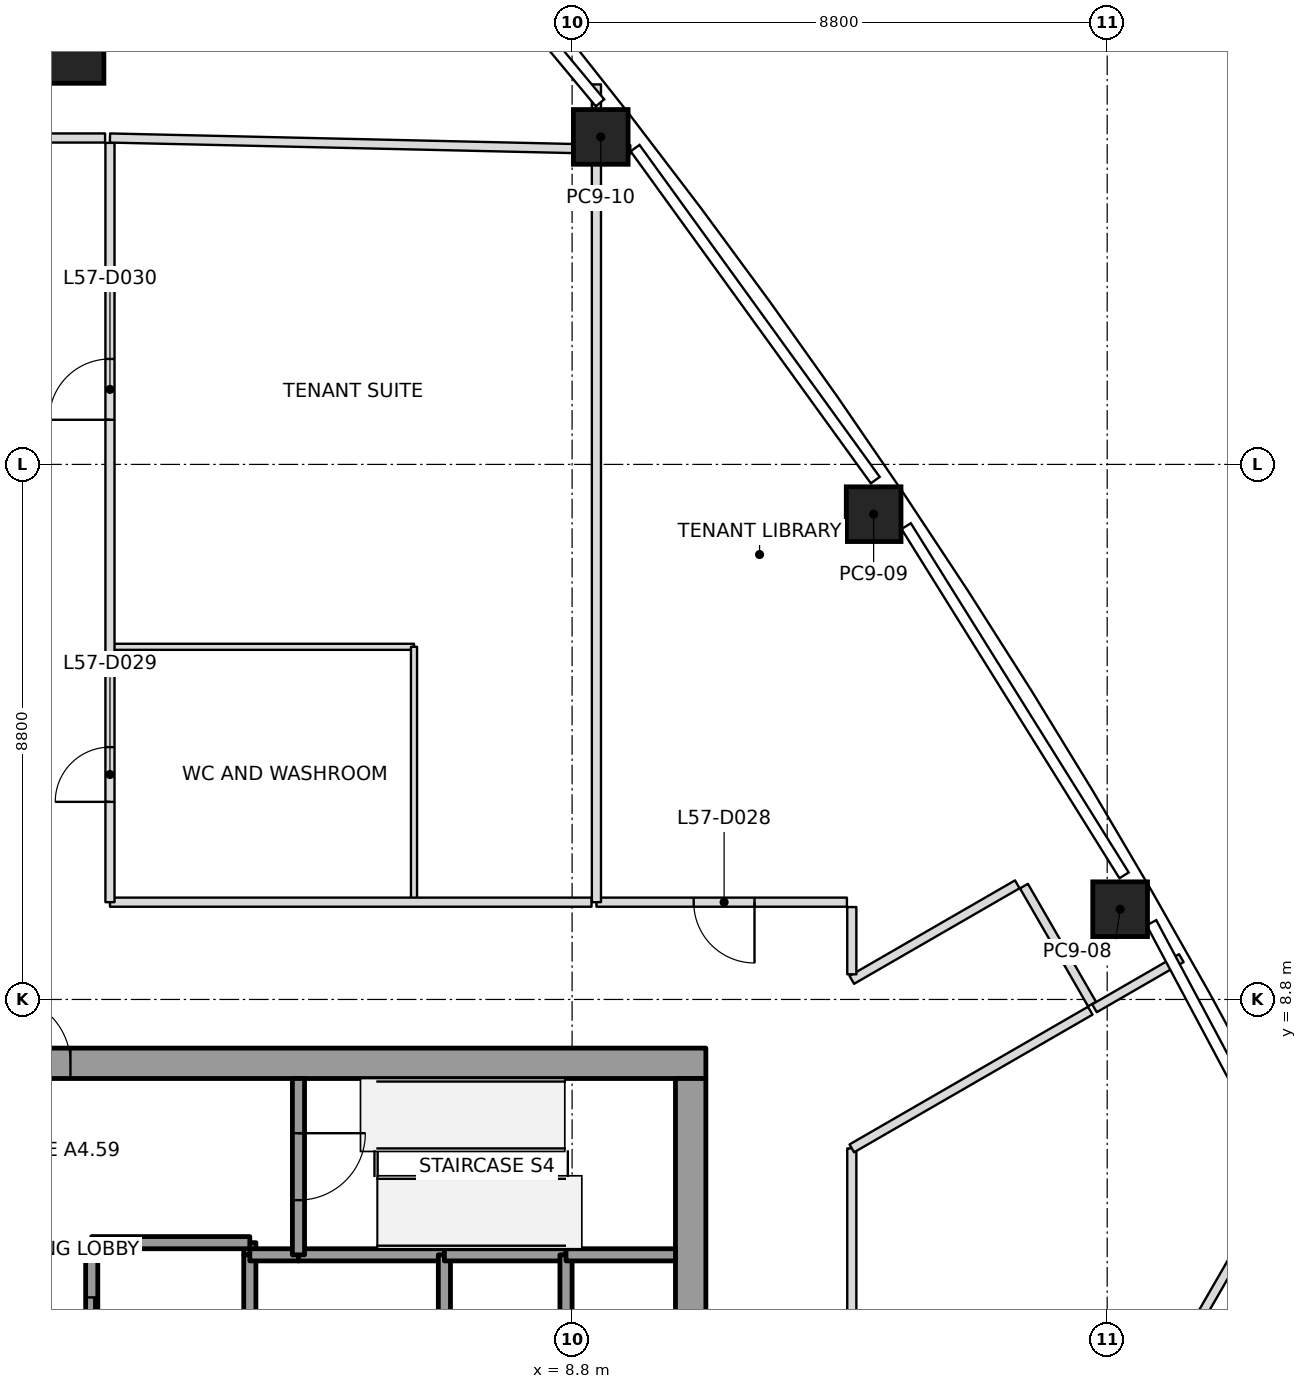
"""IFC4 building model, lengths in metres.
Left out: names, types, materials, properties, quantities, classifications, styles, units other than length and angle.
Written with IfcOpenShell. Run it as: python <this file> out.ifc"""

import sys

from ifc_helpers import new_model, si_unit, direction, frame, frame_2d, origin, origin_2d, place, context, subcontext, project, spatial, rectangle, extrude, element, fill, save


model = new_model("IFC4")
c1 = context("Model", 3, precision=1e-05, world=origin(), true_north=direction((0.0, 1.0)))
c2 = subcontext(c1, "Body", "Model", "MODEL_VIEW")
j1 = project(units=[si_unit("LENGTHUNIT", "METRE"), si_unit("PLANEANGLEUNIT", "RADIAN")], contexts=[c1])
p1 = place(None, origin())
s1 = spatial("IfcSite", under=j1, at=p1, CompositionType="ELEMENT")
p2 = place(p1, origin())
s2 = spatial("IfcBuilding", under=s1, at=p2, CompositionType="ELEMENT")
p3 = place(p2, frame((0.0, 0.0, 255.0)))
s3 = spatial("IfcBuildingStorey", under=s2, at=p3, CompositionType="ELEMENT", Elevation=255.0)
p4 = place(p3, frame((0.0, 24.968, 0.0), z_axis=(0.0, -0.032148900677, 0.999483090495), x_axis=(1.0, 0.0, 0.0)))
e1 = element("IfcColumn", 1, at=p4, inside=s3, PredefinedType="COLUMN", context=c2, shape_type="SweptSolid", body=[
    extrude(rectangle(XDim=2.2, YDim=2.2, at=origin_2d()), origin(), (0.0, 0.0, 1.0), 4.002),
])
p5 = place(p3, frame((17.813, 10.284, 0.0), z_axis=(-0.00994807791, -0.005675897212, 0.999934407817), x_axis=(-0.499975258324, 0.866039685968, -5.8244404e-05)))
e2 = element("IfcColumn", 2, at=p5, inside=s3, PredefinedType="COLUMN", context=c2, shape_type="SweptSolid", body=[
    extrude(rectangle(XDim=0.9, YDim=0.9, at=origin_2d()), origin(), (0.0, 0.0, 1.0), 4.0),
])
p6 = place(p3, frame((13.759, 16.781, 0.0), z_axis=(-0.005248490815, -0.013243284963, 0.999898529226), x_axis=(-0.558035807568, 0.829777716306, 0.008060954894)))
e3 = element("IfcColumn", 3, at=p6, inside=s3, PredefinedType="COLUMN", context=c2, shape_type="SweptSolid", body=[
    extrude(rectangle(XDim=0.9, YDim=0.9, at=origin_2d()), origin(), (0.0, 0.0, 1.0), 4.0),
])
p7 = place(p3, frame((9.271, 22.986, 0.0), z_axis=(-0.000244089904, -0.020381506962, 0.999792245716), x_axis=(-0.613475058101, 0.789553090619, 0.015945851565)))
e4 = element("IfcColumn", 4, at=p7, inside=s3, PredefinedType="COLUMN", context=c2, shape_type="SweptSolid", body=[
    extrude(rectangle(XDim=0.9, YDim=0.9, at=origin_2d()), origin(), (0.0, 0.0, 1.0), 4.001),
])
p8 = place(p3, frame((-11.0, 7.75, 0.0), z_axis=(0.0, 0.0, 1.0), x_axis=(1.0, 0.0, 0.0)))
e5 = element("IfcWall", 5, at=p8, inside=s3, PredefinedType="SHEAR", context=c2, shape_type="SweptSolid", body=[
    extrude(rectangle(XDim=22.0, YDim=0.5, at=frame_2d((11.0, 0.0))), origin(), (0.0, 0.0, 1.0), 4.0),
])
p9 = place(p8, frame((10.45, 0.0, 0.0)))
e6 = element("IfcOpeningElement", 6, at=p9, cuts=e5, PredefinedType="OPENING", context=c2, shape_type="SweptSolid", body=[
    extrude(rectangle(XDim=1.1, YDim=2.1, at=frame_2d((0.55, 1.05))), frame((0.0, 0.25, 0.0), z_axis=(0.0, -1.0, 0.0), x_axis=(1.0, 0.0, 0.0)), (0.0, 0.0, 1.0), 0.5),
])
p10 = place(p3, frame((10.75, -7.5, 0.0), z_axis=(0.0, 0.0, 1.0), x_axis=(0.0, 1.0, 0.0)))
e7 = element("IfcWall", 7, at=p10, inside=s3, PredefinedType="SHEAR", context=c2, shape_type="SweptSolid", body=[
    extrude(rectangle(XDim=15.0, YDim=0.5, at=frame_2d((7.5, 0.0))), origin(), (0.0, 0.0, 1.0), 4.0),
])
p11 = place(p10, frame((6.6, 0.0, 0.0)))
e8 = element("IfcOpeningElement", 8, at=p11, cuts=e7, PredefinedType="OPENING", context=c2, shape_type="SweptSolid", body=[
    extrude(rectangle(XDim=1.8, YDim=2.1, at=frame_2d((0.9, 1.05))), frame((0.0, 0.25, 0.0), z_axis=(0.0, -1.0, 0.0), x_axis=(1.0, 0.0, 0.0)), (0.0, 0.0, 1.0), 0.5),
])
p12 = place(p3, frame((3.5, 4.6, 0.0), z_axis=(0.0, 0.0, 1.0), x_axis=(0.0, 1.0, 0.0)))
e9 = element("IfcWall", 9, at=p12, inside=s3, PredefinedType="SOLIDWALL", context=c2, shape_type="SweptSolid", body=[
    extrude(rectangle(XDim=0.2, YDim=0.2, at=frame_2d((0.1, 0.0))), origin(), (0.0, 0.0, 1.0), 3.85),
])
p13 = place(p3, frame((3.5, 4.8, 0.0), z_axis=(0.0, 0.0, 1.0), x_axis=(-1.0, 0.0, 0.0)))
e10 = element("IfcWall", 10, at=p13, inside=s3, PredefinedType="SOLIDWALL", context=c2, shape_type="SweptSolid", body=[
    extrude(rectangle(XDim=2.6, YDim=0.2, at=frame_2d((1.3, 0.0))), origin(), (0.0, 0.0, 1.0), 3.85),
])
p14 = place(p3, frame((0.9, 4.8, 0.0), z_axis=(0.0, 0.0, 1.0), x_axis=(0.0, -1.0, 0.0)))
e11 = element("IfcWall", 11, at=p14, inside=s3, PredefinedType="SOLIDWALL", context=c2, shape_type="SweptSolid", body=[
    extrude(rectangle(XDim=3.0, YDim=0.2, at=frame_2d((1.5, 0.0))), origin(), (0.0, 0.0, 1.0), 3.85),
])
p15 = place(p14, frame((0.9, 0.0, 0.0)))
e12 = element("IfcOpeningElement", 12, at=p15, cuts=e11, PredefinedType="OPENING", context=c2, shape_type="SweptSolid", body=[
    extrude(rectangle(XDim=1.2, YDim=2.1, at=frame_2d((0.6, 1.05))), frame((0.0, 0.1, 0.0), z_axis=(0.0, -1.0, 0.0), x_axis=(1.0, 0.0, 0.0)), (0.0, 0.0, 1.0), 0.2),
])
p16 = place(p3, frame((3.5, 4.6, 0.0), z_axis=(0.0, 0.0, 1.0), x_axis=(0.0, -1.0, 0.0)))
e13 = element("IfcWall", 13, at=p16, inside=s3, PredefinedType="SOLIDWALL", context=c2, shape_type="SweptSolid", body=[
    extrude(rectangle(XDim=2.8, YDim=0.2, at=frame_2d((1.4, 0.0))), origin(), (0.0, 0.0, 1.0), 3.85),
])
p17 = place(p3, frame((4.3, 4.6, 0.0), z_axis=(0.0, 0.0, 1.0), x_axis=(-1.0, 0.0, 0.0)))
e14 = element("IfcWall", 14, at=p17, inside=s3, PredefinedType="SOLIDWALL", context=c2, shape_type="SweptSolid", body=[
    extrude(rectangle(XDim=0.8, YDim=0.2, at=frame_2d((0.4, 0.0))), origin(), (0.0, 0.0, 1.0), 3.85),
])
p18 = place(p3, frame((6.7, 4.6, 0.0), z_axis=(0.0, 0.0, 1.0), x_axis=(-1.0, 0.0, 0.0)))
e15 = element("IfcWall", 15, at=p18, inside=s3, PredefinedType="SOLIDWALL", context=c2, shape_type="SweptSolid", body=[
    extrude(rectangle(XDim=2.4, YDim=0.2, at=frame_2d((1.2, 0.0))), origin(), (0.0, 0.0, 1.0), 3.85),
])
p19 = place(p3, frame((4.3, 7.5, 0.0), z_axis=(0.0, 0.0, 1.0), x_axis=(0.0, -1.0, 0.0)))
e16 = element("IfcWall", 16, at=p19, inside=s3, PredefinedType="SOLIDWALL", context=c2, shape_type="SweptSolid", body=[
    extrude(rectangle(XDim=2.9, YDim=0.2, at=frame_2d((1.45, 0.0))), origin(), (0.0, 0.0, 1.0), 3.85),
])
p20 = place(p19, frame((0.9, 0.0, 0.0)))
e17 = element("IfcOpeningElement", 17, at=p20, cuts=e16, PredefinedType="OPENING", context=c2, shape_type="SweptSolid", body=[
    extrude(rectangle(XDim=1.1, YDim=2.1, at=frame_2d((0.55, 1.05))), frame((0.0, 0.1, 0.0), z_axis=(0.0, -1.0, 0.0), x_axis=(1.0, 0.0, 0.0)), (0.0, 0.0, 1.0), 0.2),
])
p21 = place(p3, frame((6.7, 1.8, 0.0), z_axis=(0.0, 0.0, 1.0), x_axis=(0.0, 1.0, 0.0)))
e18 = element("IfcWall", 18, at=p21, inside=s3, PredefinedType="SOLIDWALL", context=c2, shape_type="SweptSolid", body=[
    extrude(rectangle(XDim=2.8, YDim=0.2, at=frame_2d((1.4, 0.0))), origin(), (0.0, 0.0, 1.0), 3.85),
])
p22 = place(p3, frame((8.7, 4.6, 0.0), z_axis=(0.0, 0.0, 1.0), x_axis=(-1.0, 0.0, 0.0)))
e19 = element("IfcWall", 19, at=p22, inside=s3, PredefinedType="SOLIDWALL", context=c2, shape_type="SweptSolid", body=[
    extrude(rectangle(XDim=2.0, YDim=0.2, at=frame_2d((1.0, 0.0))), origin(), (0.0, 0.0, 1.0), 3.85),
])
p23 = place(p3, frame((8.7, 1.8, 0.0), z_axis=(0.0, 0.0, 1.0), x_axis=(0.0, 1.0, 0.0)))
e20 = element("IfcWall", 20, at=p23, inside=s3, PredefinedType="SOLIDWALL", context=c2, shape_type="SweptSolid", body=[
    extrude(rectangle(XDim=2.8, YDim=0.2, at=frame_2d((1.4, 0.0))), origin(), (0.0, 0.0, 1.0), 3.85),
])
p24 = place(p3, frame((10.5, 4.6, 0.0), z_axis=(0.0, 0.0, 1.0), x_axis=(-1.0, 0.0, 0.0)))
e21 = element("IfcWall", 21, at=p24, inside=s3, PredefinedType="SOLIDWALL", context=c2, shape_type="SweptSolid", body=[
    extrude(rectangle(XDim=1.8, YDim=0.2, at=frame_2d((0.9, 0.0))), origin(), (0.0, 0.0, 1.0), 3.85),
])
p25 = place(p3, frame((1.2, 22.968, 0.0), z_axis=(0.0, 0.0, 1.0), x_axis=(0.99974152619, -0.022735012879, 0.0)))
e22 = element("IfcWall", 22, at=p25, inside=s3, PredefinedType="PARTITIONING", context=c2, shape_type="SweptSolid", body=[
    extrude(rectangle(XDim=8.559, YDim=0.15, at=frame_2d((4.279, 0.0))), origin(), (0.0, 0.0, 1.0), 3.3),
])
p26 = place(p3, frame((9.2, 10.4, 0.0), z_axis=(0.0, 0.0, 1.0), x_axis=(0.0, 1.0, 0.0)))
e23 = element("IfcWall", 23, at=p26, inside=s3, PredefinedType="PARTITIONING", context=c2, shape_type="SweptSolid", body=[
    extrude(rectangle(XDim=13.45, YDim=0.15, at=frame_2d((6.725, 0.0))), origin(), (0.0, 0.0, 1.0), 3.3),
])
p27 = place(p3, frame((20.62, 6.154, 0.0), z_axis=(0.0, 0.0, 1.0), x_axis=(-0.500001511722, -0.866024530989, 0.0)))
e24 = element("IfcWall", 24, at=p27, inside=s3, PredefinedType="PARTITIONING", context=c2, shape_type="SweptSolid", body=[
    extrude(rectangle(XDim=14.439, YDim=0.15, at=frame_2d((7.22, 0.0))), origin(), (0.0, 0.0, 1.0), 3.084),
])
p28 = place(p3, frame((17.391, 8.655, 0.0), z_axis=(0.0, 0.0, 1.0), x_axis=(0.865966208357, 0.500102515474, 0.0)))
e25 = element("IfcWall", 25, at=p28, inside=s3, PredefinedType="PARTITIONING", context=c2, shape_type="SweptSolid", body=[
    extrude(rectangle(XDim=1.65, YDim=0.15, at=frame_2d((0.825, 0.0))), origin(), (0.0, 0.0, 1.0), 3.084),
])
p29 = place(p3, frame((1.12, 22.968, 0.0), z_axis=(0.0, 0.0, 1.0), x_axis=(-1.0, 0.0, 0.0)))
e26 = element("IfcWall", 26, at=p29, inside=s3, PredefinedType="PARTITIONING", context=c2, shape_type="SweptSolid", body=[
    extrude(rectangle(XDim=2.24, YDim=0.15, at=frame_2d((1.12, 0.0))), origin(), (0.0, 0.0, 1.0), 3.233),
])
p30 = place(p3, frame((9.12, 10.4, 0.0), z_axis=(0.0, 0.0, 1.0), x_axis=(-1.0, 0.0, 0.0)))
e27 = element("IfcWall", 27, at=p30, inside=s3, PredefinedType="PARTITIONING", context=c2, shape_type="SweptSolid", body=[
    extrude(rectangle(XDim=7.92, YDim=0.15, at=frame_2d((3.96, 0.0))), origin(), (0.0, 0.0, 1.0), 3.3),
])
p31 = place(p3, frame((1.2, 10.4, 0.0), z_axis=(0.0, 0.0, 1.0), x_axis=(0.0, 1.0, 0.0)))
e28 = element("IfcWall", 28, at=p31, inside=s3, PredefinedType="PARTITIONING", context=c2, shape_type="SweptSolid", body=[
    extrude(rectangle(XDim=12.488, YDim=0.15, at=frame_2d((6.244, 0.0))), origin(), (0.0, 0.0, 1.0), 3.3),
])
p32 = place(p31, frame((1.65, 0.0, 0.0)))
e29 = element("IfcOpeningElement", 29, at=p32, cuts=e28, PredefinedType="OPENING", context=c2, shape_type="SweptSolid", body=[
    extrude(rectangle(XDim=0.9, YDim=2.1, at=frame_2d((0.45, 1.05))), frame((0.0, 0.075, 0.0), z_axis=(0.0, -1.0, 0.0), x_axis=(1.0, 0.0, 0.0)), (0.0, 0.0, 1.0), 0.15),
])
p33 = place(p31, frame((7.934, 0.0, 0.0)))
e30 = element("IfcOpeningElement", 30, at=p33, cuts=e28, PredefinedType="OPENING", context=c2, shape_type="SweptSolid", body=[
    extrude(rectangle(XDim=1.0, YDim=2.1, at=frame_2d((0.5, 1.05))), frame((0.0, 0.075, 0.0), z_axis=(0.0, -1.0, 0.0), x_axis=(1.0, 0.0, 0.0)), (0.0, 0.0, 1.0), 0.15),
])
p34 = place(p3, frame((13.32, 10.4, 0.0), z_axis=(0.0, 0.0, 1.0), x_axis=(-1.0, 0.0, 0.0)))
e31 = element("IfcWall", 31, at=p34, inside=s3, PredefinedType="PARTITIONING", context=c2, shape_type="SweptSolid", body=[
    extrude(rectangle(XDim=4.12, YDim=0.15, at=frame_2d((2.06, 0.0))), origin(), (0.0, 0.0, 1.0), 3.3),
])
p35 = place(p34, frame((1.52, 0.0, 0.0)))
e32 = element("IfcOpeningElement", 32, at=p35, cuts=e31, PredefinedType="OPENING", context=c2, shape_type="SweptSolid", body=[
    extrude(rectangle(XDim=1.0, YDim=2.1, at=frame_2d((0.5, 1.05))), frame((0.0, 0.075, 0.0), z_axis=(0.0, -1.0, 0.0), x_axis=(1.0, 0.0, 0.0)), (0.0, 0.0, 1.0), 0.15),
])
p36 = place(p3, frame((13.4, -6.351, 0.0), z_axis=(0.0, 0.0, 1.0), x_axis=(0.0, 1.0, 0.0)))
e33 = element("IfcWall", 33, at=p36, inside=s3, PredefinedType="PARTITIONING", context=c2, shape_type="SweptSolid", body=[
    extrude(rectangle(XDim=12.702, YDim=0.15, at=frame_2d((6.351, 0.0))), origin(), (0.0, 0.0, 1.0), 3.167),
])
p37 = place(p36, frame((5.851, 0.0, 0.0)))
e34 = element("IfcOpeningElement", 34, at=p37, cuts=e33, PredefinedType="OPENING", context=c2, shape_type="SweptSolid", body=[
    extrude(rectangle(XDim=1.0, YDim=2.1, at=frame_2d((0.5, 1.05))), frame((0.0, 0.075, 0.0), z_axis=(0.0, -1.0, 0.0), x_axis=(1.0, 0.0, 0.0)), (0.0, 0.0, 1.0), 0.15),
])
p38 = place(p3, frame((13.4, 6.351, 0.0), z_axis=(0.0, 0.0, 1.0), x_axis=(0.866038353239, 0.499977570215, 0.0)))
e35 = element("IfcWall", 35, at=p38, inside=s3, PredefinedType="PARTITIONING", context=c2, shape_type="SweptSolid", body=[
    extrude(rectangle(XDim=4.529, YDim=0.15, at=frame_2d((2.264, 0.0))), origin(), (0.0, 0.0, 1.0), 3.3),
])
p39 = place(p3, frame((16.122, 10.694, 0.0), z_axis=(0.0, 0.0, 1.0), x_axis=(-0.866001883582, -0.500040735972, 0.0)))
e36 = element("IfcWall", 36, at=p39, inside=s3, PredefinedType="PARTITIONING", context=c2, shape_type="SweptSolid", body=[
    extrude(rectangle(XDim=3.143, YDim=0.15, at=frame_2d((1.571, 0.0))), origin(), (0.0, 0.0, 1.0), 3.3),
])
p40 = place(p3, frame((13.4, 9.214, 0.0), z_axis=(0.0, 0.0, 1.0), x_axis=(0.0, 1.0, 0.0)))
e37 = element("IfcWall", 37, at=p40, inside=s3, PredefinedType="PARTITIONING", context=c2, shape_type="SweptSolid", body=[
    extrude(rectangle(XDim=1.106, YDim=0.15, at=frame_2d((0.553, 0.0))), origin(), (0.0, 0.0, 1.0), 3.3),
])
p41 = place(p3, frame((17.351, 8.724, 0.0), z_axis=(0.0, 0.0, 1.0), x_axis=(-0.500030632641, 0.866007717299, 0.0)))
e38 = element("IfcWall", 38, at=p41, inside=s3, PredefinedType="PARTITIONING", context=c2, shape_type="SweptSolid", body=[
    extrude(rectangle(XDim=2.24, YDim=0.15, at=frame_2d((1.12, 0.0))), origin(), (0.0, 0.0, 1.0), 3.3),
])
p42 = place(p3, frame((1.23, 14.6, 0.0), z_axis=(0.0, 0.0, 1.0), x_axis=(1.0, 0.0, 0.0)))
e39 = element("IfcWall", 39, at=p42, inside=s3, PredefinedType="PARTITIONING", context=c2, shape_type="SweptSolid", body=[
    extrude(rectangle(XDim=4.97, YDim=0.1, at=frame_2d((2.485, 0.0))), origin(), (0.0, 0.0, 1.0), 3.3),
])
p43 = place(p3, frame((6.2, 14.6, 0.0), z_axis=(0.0, 0.0, 1.0), x_axis=(0.0, -1.0, 0.0)))
e40 = element("IfcWall", 40, at=p43, inside=s3, PredefinedType="PARTITIONING", context=c2, shape_type="SweptSolid", body=[
    extrude(rectangle(XDim=4.17, YDim=0.1, at=frame_2d((2.085, 0.0))), origin(), (0.0, 0.0, 1.0), 3.3),
])
p44 = place(p35, origin())
e41 = element("IfcDoor", 41, at=p44, inside=s3, OperationType="SINGLE_SWING_LEFT", PredefinedType="DOOR", context=c2, shape_type="SweptSolid", body=[
    extrude(rectangle(XDim=1.0, YDim=2.1, at=frame_2d((0.5, 1.05))), frame((0.0, 0.025, 0.0), z_axis=(0.0, -1.0, 0.0), x_axis=(1.0, 0.0, 0.0)), (0.0, 0.0, 1.0), 0.05),
])
fill(e32, e41)
p45 = place(p32, origin())
e42 = element("IfcDoor", 42, at=p45, inside=s3, OperationType="SINGLE_SWING_LEFT", PredefinedType="DOOR", context=c2, shape_type="SweptSolid", body=[
    extrude(rectangle(XDim=0.9, YDim=2.1, at=frame_2d((0.45, 1.05))), frame((0.0, 0.025, 0.0), z_axis=(0.0, -1.0, 0.0), x_axis=(1.0, 0.0, 0.0)), (0.0, 0.0, 1.0), 0.05),
])
fill(e29, e42)
p46 = place(p33, origin())
e43 = element("IfcDoor", 43, at=p46, inside=s3, OperationType="SINGLE_SWING_LEFT", PredefinedType="DOOR", context=c2, shape_type="SweptSolid", body=[
    extrude(rectangle(XDim=1.0, YDim=2.1, at=frame_2d((0.5, 1.05))), frame((0.0, 0.025, 0.0), z_axis=(0.0, -1.0, 0.0), x_axis=(1.0, 0.0, 0.0)), (0.0, 0.0, 1.0), 0.05),
])
fill(e30, e43)
p47 = place(p15, origin())
e44 = element("IfcDoor", 44, at=p47, inside=s3, OperationType="SLIDING_TO_LEFT", PredefinedType="DOOR", context=c2, shape_type="SweptSolid", body=[
    extrude(rectangle(XDim=1.2, YDim=2.1, at=frame_2d((0.6, 1.05))), frame((0.0, 0.025, 0.0), z_axis=(0.0, -1.0, 0.0), x_axis=(1.0, 0.0, 0.0)), (0.0, 0.0, 1.0), 0.05),
])
fill(e12, e44)
p48 = place(p20, origin())
e45 = element("IfcDoor", 45, at=p48, inside=s3, OperationType="SINGLE_SWING_LEFT", PredefinedType="DOOR", context=c2, shape_type="SweptSolid", body=[
    extrude(rectangle(XDim=1.1, YDim=2.1, at=frame_2d((0.55, 1.05))), frame((0.0, 0.025, 0.0), z_axis=(0.0, -1.0, 0.0), x_axis=(1.0, 0.0, 0.0)), (0.0, 0.0, 1.0), 0.05),
])
fill(e17, e45)
p49 = place(p9, origin())
e46 = element("IfcDoor", 46, at=p49, inside=s3, OperationType="SINGLE_SWING_LEFT", PredefinedType="DOOR", context=c2, shape_type="SweptSolid", body=[
    extrude(rectangle(XDim=1.1, YDim=2.1, at=frame_2d((0.55, 1.05))), frame((0.0, 0.025, 0.0), z_axis=(0.0, -1.0, 0.0), x_axis=(1.0, 0.0, 0.0)), (0.0, 0.0, 1.0), 0.05),
])
fill(e6, e46)
save(model, sys.argv[1])
